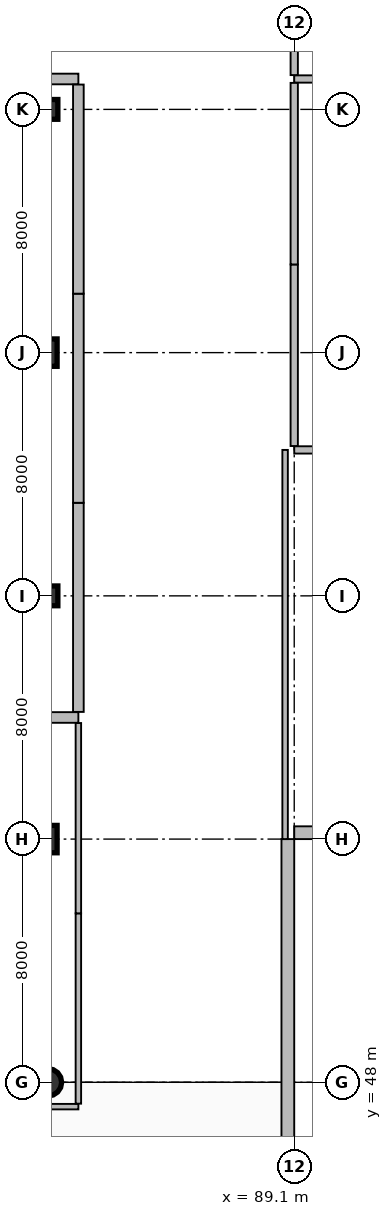
"""IFC4 building model, lengths in metres.
Left out: names, types, materials, properties, quantities, classifications, styles, units other than length and angle.
Written with IfcOpenShell. Run it as: python <this file> out.ifc"""

import sys

from ifc_helpers import new_model, si_unit, direction, frame, frame_2d, origin, origin_2d, place, context, subcontext, project, spatial, rectangle, circle, extrude, element, fill, save


model = new_model("IFC4")
c1 = context("Model", 3, precision=1e-05, world=origin(), true_north=direction((0.0, 1.0)))
c2 = subcontext(c1, "Body", "Model", "MODEL_VIEW")
j1 = project(units=[si_unit("LENGTHUNIT", "METRE"), si_unit("PLANEANGLEUNIT", "RADIAN")], contexts=[c1])
p1 = place(None, origin())
s1 = spatial("IfcSite", under=j1, at=p1, CompositionType="ELEMENT")
p2 = place(p1, origin())
s2 = spatial("IfcBuilding", under=s1, at=p2, CompositionType="ELEMENT")
p3 = place(p2, frame((0.0, 0.0, -4.8)))
s3 = spatial("IfcBuildingStorey", under=s2, at=p3, CompositionType="ELEMENT", Elevation=-4.8)
p4 = place(p3, frame((126.79, 56.21, 0.0), z_axis=(0.0, 0.0, 1.0), x_axis=(-1.0, 0.0, 0.0)))
e1 = element("IfcWall", 1, at=p4, inside=s3, PredefinedType="USERDEFINED", context=c2, shape_type="SweptSolid", body=[
    extrude(rectangle(XDim=37.69, YDim=0.42, at=frame_2d((18.845, 0.0))), origin(), (0.0, 0.0, 1.0), 4.45),
])
p5 = place(p3, frame((88.89, 56.0, 0.0), z_axis=(0.0, 0.0, 1.0), x_axis=(0.0, -1.0, 0.0)))
e2 = element("IfcWall", 2, at=p5, inside=s3, PredefinedType="USERDEFINED", context=c2, shape_type="SweptSolid", body=[
    extrude(rectangle(XDim=31.79, YDim=0.42, at=frame_2d((15.895, 0.0))), origin(), (0.0, 0.0, 1.0), 4.45),
])
p6 = place(p3, frame((81.0, 48.0, 0.0), z_axis=(0.0, 0.0, 1.0), x_axis=(1.0, 0.0, 0.0)))
e3 = element("IfcColumn", 3, at=p6, inside=s3, PredefinedType="COLUMN", context=c2, shape_type="SweptSolid", body=[
    extrude(circle(Radius=0.45, at=origin_2d()), origin(), (0.0, 0.0, 1.0), 4.8),
])
p7 = place(p3, frame((81.0, 56.0, 0.0), z_axis=(0.0, 0.0, 1.0), x_axis=(1.0, 0.0, 0.0)))
e4 = element("IfcColumn", 4, at=p7, inside=s3, PredefinedType="COLUMN", context=c2, shape_type="SweptSolid", body=[
    extrude(rectangle(XDim=0.6, YDim=0.9, at=origin_2d()), origin(), (0.0, 0.0, 1.0), 4.8),
])
p8 = place(p3, frame((81.0, 64.0, 0.0), z_axis=(0.0, 0.0, 1.0), x_axis=(1.0, 0.0, 0.0)))
e5 = element("IfcColumn", 5, at=p8, inside=s3, PredefinedType="COLUMN", context=c2, shape_type="SweptSolid", body=[
    extrude(rectangle(XDim=0.65, YDim=0.65, at=origin_2d()), origin(), (0.0, 0.0, 1.0), 4.8),
])
p9 = place(p3, frame((81.0, 72.0, 0.0), z_axis=(0.0, 0.0, 1.0), x_axis=(1.0, 0.0, 0.0)))
e6 = element("IfcColumn", 6, at=p9, inside=s3, PredefinedType="COLUMN", context=c2, shape_type="SweptSolid", body=[
    extrude(rectangle(XDim=0.6, YDim=0.9, at=origin_2d()), origin(), (0.0, 0.0, 1.0), 4.8),
])
p10 = place(p3, frame((81.0, 80.0, 0.0), z_axis=(0.0, 0.0, 1.0), x_axis=(1.0, 0.0, 0.0)))
e7 = element("IfcColumn", 7, at=p10, inside=s3, PredefinedType="COLUMN", context=c2, shape_type="SweptSolid", body=[
    extrude(rectangle(XDim=0.65, YDim=0.65, at=origin_2d()), origin(), (0.0, 0.0, 1.0), 4.8),
])
p11 = place(p3, frame((64.8, 47.2, 0.0), z_axis=(0.0, 0.0, 1.0), x_axis=(1.0, 0.0, 0.0)))
e8 = element("IfcWall", 8, at=p11, inside=s3, PredefinedType="PARTITIONING", context=c2, shape_type="SweptSolid", body=[
    extrude(rectangle(XDim=17.2, YDim=0.18, at=frame_2d((8.6, 0.0))), origin(), (0.0, 0.0, 1.0), 4.45),
])
p12 = place(p11, frame((5.248, 0.0, 0.0)))
e9 = element("IfcOpeningElement", 9, at=p12, cuts=e8, PredefinedType="OPENING", context=c2, shape_type="SweptSolid", body=[
    extrude(rectangle(XDim=1.2, YDim=2.2, at=frame_2d((0.6, 1.1))), frame((0.0, 0.1, 0.0), z_axis=(0.0, -1.0, 0.0), x_axis=(1.0, 0.0, 0.0)), (0.0, 0.0, 1.0), 0.2),
])
p13 = place(p3, frame((76.267, 60.0, 0.0), z_axis=(0.0, 0.0, 1.0), x_axis=(1.0, 0.0, 0.0)))
e10 = element("IfcWall", 10, at=p13, inside=s3, PredefinedType="SOLIDWALL", context=c2, shape_type="SweptSolid", body=[
    extrude(rectangle(XDim=5.733, YDim=0.35, at=frame_2d((2.867, 0.0))), origin(), (0.0, 0.0, 1.0), 4.45),
])
p14 = place(p3, frame((64.8, 81.0, 0.0), z_axis=(0.0, 0.0, 1.0), x_axis=(1.0, 0.0, 0.0)))
e11 = element("IfcWall", 11, at=p14, inside=s3, PredefinedType="SOLIDWALL", context=c2, shape_type="SweptSolid", body=[
    extrude(rectangle(XDim=17.2, YDim=0.35, at=frame_2d((8.6, 0.0))), origin(), (0.0, 0.0, 1.0), 4.45),
])
p15 = place(p14, frame((5.298, 0.0, 0.0)))
e12 = element("IfcOpeningElement", 12, at=p15, cuts=e11, PredefinedType="OPENING", context=c2, shape_type="SweptSolid", body=[
    extrude(rectangle(XDim=1.1, YDim=2.25, at=frame_2d((0.55, 1.125))), frame((0.0, 0.185, 0.0), z_axis=(0.0, -1.0, 0.0), x_axis=(1.0, 0.0, 0.0)), (0.0, 0.0, 1.0), 0.37),
])
p16 = place(p3, frame((89.1, 68.8, 0.0), z_axis=(0.0, 0.0, 1.0), x_axis=(1.0, 0.0, 0.0)))
e13 = element("IfcWall", 13, at=p16, inside=s3, PredefinedType="PARTITIONING", context=c2, shape_type="SweptSolid", body=[
    extrude(rectangle(XDim=16.6, YDim=0.24, at=frame_2d((8.3, 0.0))), origin(), (0.0, 0.0, 1.0), 4.45),
])
p17 = place(p16, frame((7.6, 0.0, 0.0)))
e14 = element("IfcOpeningElement", 14, at=p17, cuts=e13, PredefinedType="OPENING", context=c2, shape_type="SweptSolid", body=[
    extrude(rectangle(XDim=1.4, YDim=2.35, at=frame_2d((0.7, 1.175))), frame((0.0, 0.13, 0.0), z_axis=(0.0, -1.0, 0.0), x_axis=(1.0, 0.0, 0.0)), (0.0, 0.0, 1.0), 0.26),
])
p18 = place(p3, frame((89.1, 81.0, 0.0), z_axis=(0.0, 0.0, 1.0), x_axis=(1.0, 0.0, 0.0)))
e15 = element("IfcWall", 15, at=p18, inside=s3, PredefinedType="PARTITIONING", context=c2, shape_type="SweptSolid", body=[
    extrude(rectangle(XDim=23.9, YDim=0.24, at=frame_2d((11.95, 0.0))), origin(), (0.0, 0.0, 1.0), 4.45),
])
p19 = place(p18, frame((11.4, 0.0, 0.0)))
e16 = element("IfcOpeningElement", 16, at=p19, cuts=e15, PredefinedType="OPENING", context=c2, shape_type="SweptSolid", body=[
    extrude(rectangle(XDim=1.1, YDim=2.25, at=frame_2d((0.55, 1.125))), frame((0.0, 0.13, 0.0), z_axis=(0.0, -1.0, 0.0), x_axis=(1.0, 0.0, 0.0)), (0.0, 0.0, 1.0), 0.26),
])
p20 = place(p3, frame((82.0, 47.298, 0.0), z_axis=(0.0, 0.0, 1.0), x_axis=(0.0, 1.0, 0.0)))
e17 = element("IfcWall", 17, at=p20, inside=s3, PredefinedType="PARTITIONING", context=c2, shape_type="SweptSolid", body=[
    extrude(rectangle(XDim=6.26, YDim=0.18, at=frame_2d((3.13, 0.0))), origin(), (0.0, 0.0, 1.0), 4.45),
])
p21 = place(p3, frame((82.0, 53.558, 0.0), z_axis=(0.0, 0.0, 1.0), x_axis=(0.0, 1.0, 0.0)))
e18 = element("IfcWall", 18, at=p21, inside=s3, PredefinedType="PARTITIONING", context=c2, shape_type="SweptSolid", body=[
    extrude(rectangle(XDim=6.259, YDim=0.18, at=frame_2d((3.13, 0.0))), origin(), (0.0, 0.0, 1.0), 4.45),
])
for number, where, z_axis, x_axis in (
    (19, (82.0, 60.183, 0.0), (0.0, 0.0, 1.0), (0.0, 1.0, 0.0)),
    (20, (82.0, 67.061, 0.0), (0.0, 0.0, 1.0), (0.0, 1.0, 0.0)),
    (21, (82.0, 73.939, 0.0), (0.0, 0.0, 1.0), (0.0, 1.0, 0.0)),
):
    element("IfcWall", number, at=place(p3, frame(where, z_axis=z_axis, x_axis=x_axis)), inside=s3, PredefinedType="SOLIDWALL", context=c2, shape_type="SweptSolid", body=[
        extrude(rectangle(XDim=6.878, YDim=0.35, at=frame_2d((3.439, 0.0))), origin(), (0.0, 0.0, 1.0), 4.45),
    ])
p22 = place(p3, frame((88.8, 56.0, 0.0), z_axis=(0.0, 0.0, 1.0), x_axis=(0.0, 1.0, 0.0)))
e22 = element("IfcWall", 22, at=p22, inside=s3, PredefinedType="PARTITIONING", context=c2, shape_type="SweptSolid", body=[
    extrude(rectangle(XDim=12.8, YDim=0.18, at=frame_2d((6.4, 0.0))), origin(), (0.0, 0.0, 1.0), 4.45),
])
p23 = place(p22, frame((5.8, 0.0, 0.0)))
e23 = element("IfcOpeningElement", 23, at=p23, cuts=e22, PredefinedType="OPENING", context=c2, shape_type="SweptSolid", body=[
    extrude(rectangle(XDim=1.2, YDim=2.2, at=frame_2d((0.6, 1.1))), frame((0.0, 0.1, 0.0), z_axis=(0.0, -1.0, 0.0), x_axis=(1.0, 0.0, 0.0)), (0.0, 0.0, 1.0), 0.2),
])
p24 = place(p3, frame((89.1, 68.928, 0.0), z_axis=(0.0, 0.0, 1.0), x_axis=(0.0, 1.0, 0.0)))
e24 = element("IfcWall", 24, at=p24, inside=s3, PredefinedType="PARTITIONING", context=c2, shape_type="SweptSolid", body=[
    extrude(rectangle(XDim=5.972, YDim=0.24, at=frame_2d((2.986, 0.0))), origin(), (0.0, 0.0, 1.0), 4.45),
])
p25 = place(p3, frame((89.1, 74.9, 0.0), z_axis=(0.0, 0.0, 1.0), x_axis=(0.0, 1.0, 0.0)))
e25 = element("IfcWall", 25, at=p25, inside=s3, PredefinedType="PARTITIONING", context=c2, shape_type="SweptSolid", body=[
    extrude(rectangle(XDim=5.972, YDim=0.24, at=frame_2d((2.986, 0.0))), origin(), (0.0, 0.0, 1.0), 4.45),
])
p26 = place(p3, frame((89.1, 81.128, 0.0), z_axis=(0.0, 0.0, 1.0), x_axis=(0.0, 1.0, 0.0)))
e26 = element("IfcWall", 26, at=p26, inside=s3, PredefinedType="PARTITIONING", context=c2, shape_type="SweptSolid", body=[
    extrude(rectangle(XDim=6.564, YDim=0.24, at=frame_2d((3.282, 0.0))), origin(), (0.0, 0.0, 1.0), 4.45),
])
p27 = place(p23, frame((1.2, 0.0, 0.0), z_axis=(0.0, 0.0, 1.0), x_axis=(-1.0, 0.0, 0.0)))
e27 = element("IfcDoor", 27, at=p27, inside=s3, OperationType="SINGLE_SWING_LEFT", PredefinedType="DOOR", context=c2, shape_type="SweptSolid", body=[
    extrude(rectangle(XDim=1.2, YDim=2.2, at=frame_2d((0.6, 1.1))), frame((0.0, 0.025, 0.0), z_axis=(0.0, -1.0, 0.0), x_axis=(1.0, 0.0, 0.0)), (0.0, 0.0, 1.0), 0.05),
])
fill(e23, e27)
save(model, sys.argv[1])
